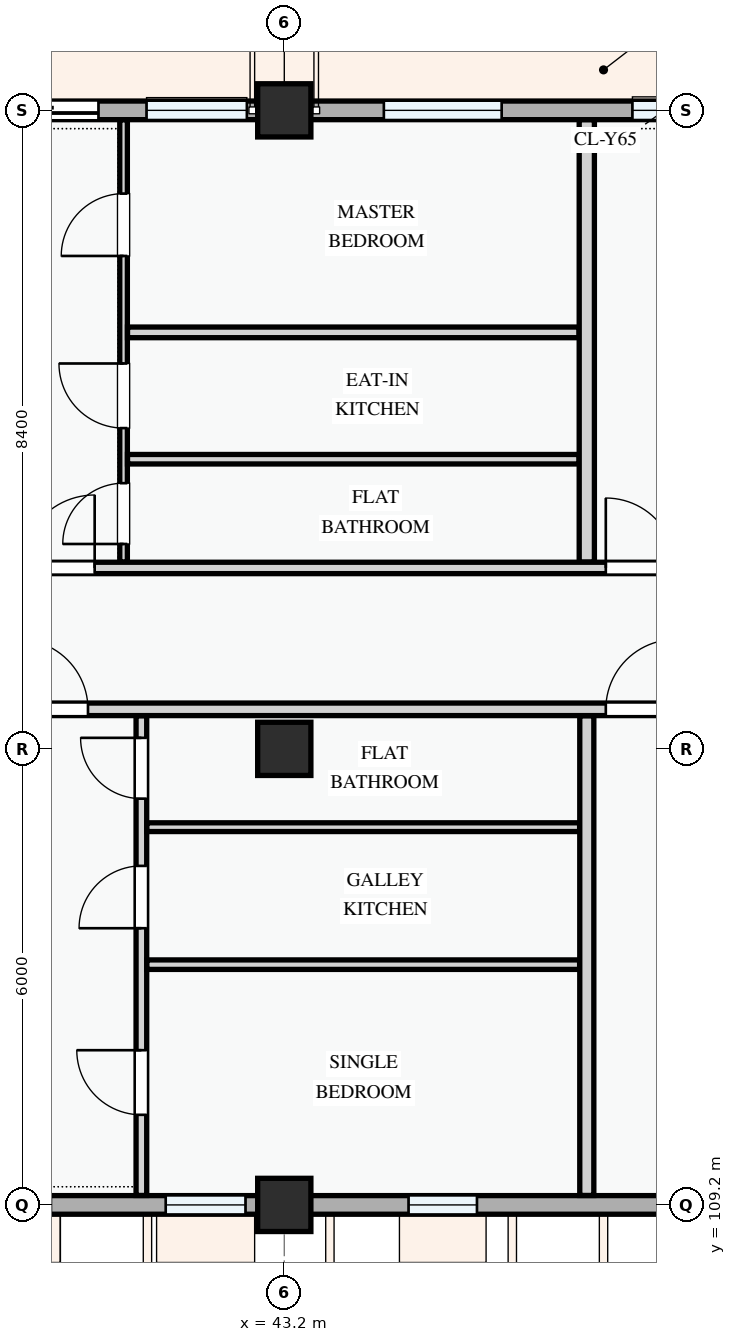
"""IFC4 building model, lengths in metres.
Left out: names, types, materials, properties, quantities, classifications, styles, units other than length and angle.
Written with IfcOpenShell. Run it as: python <this file> out.ifc"""

import sys

from ifc_helpers import new_model, si_unit, direction, frame, frame_2d, origin, origin_2d, place, context, subcontext, project, spatial, rectangle, extrude, element, fill, save


model = new_model("IFC4")
c1 = context("Model", 3, precision=1e-05, world=origin(), true_north=direction((0.0, 1.0)))
c2 = subcontext(c1, "Body", "Model", "MODEL_VIEW")
j1 = project(units=[si_unit("LENGTHUNIT", "METRE"), si_unit("PLANEANGLEUNIT", "RADIAN")], contexts=[c1])
p1 = place(None, origin())
s1 = spatial("IfcSite", under=j1, at=p1, CompositionType="ELEMENT")
p2 = place(p1, origin())
s2 = spatial("IfcBuilding", under=s1, at=p2, CompositionType="ELEMENT")
p3 = place(p2, frame((0.0, 0.0, 8.1)))
s3 = spatial("IfcBuildingStorey", under=s2, at=p3, CompositionType="ELEMENT", Elevation=8.1)
for number, where, z_axis, x_axis in (
    (1, (43.2, 109.2, 0.0), (0.0, 0.0, 1.0), (1.0, 0.0, 0.0)),
    (2, (43.2, 115.2, 0.0), (0.0, 0.0, 1.0), (1.0, 0.0, 0.0)),
    (3, (43.2, 123.6, 0.0), (0.0, 0.0, 1.0), (1.0, 0.0, 0.0)),
):
    element("IfcColumn", number, at=place(p3, frame(where, z_axis=z_axis, x_axis=x_axis)), inside=s3, PredefinedType="COLUMN", context=c2, shape_type="SweptSolid", body=[
        extrude(rectangle(XDim=0.7, YDim=0.7, at=origin_2d()), origin(), (0.0, 0.0, 1.0), 3.3),
    ])
p4 = place(p3, frame((37.2, 109.2, 0.0), z_axis=(0.0, 0.0, 1.0), x_axis=(1.0, 0.0, 0.0)))
e4 = element("IfcWall", 4, at=p4, inside=s3, PredefinedType="STANDARD", context=c2, shape_type="SweptSolid", body=[
    extrude(rectangle(XDim=6.0, YDim=0.245, at=frame_2d((3.0, 0.0))), origin(), (0.0, 0.0, 1.0), 2.475),
])
p5 = place(p4, frame((1.38, 0.0, 0.78)))
e5 = element("IfcOpeningElement", 5, at=p5, cuts=e4, PredefinedType="OPENING", context=c2, shape_type="SweptSolid", body=[
    extrude(rectangle(XDim=1.55, YDim=1.4, at=frame_2d((0.775, 0.7))), frame((0.0, 0.133, 0.0), z_axis=(0.0, -1.0, 0.0), x_axis=(1.0, 0.0, 0.0)), (0.0, 0.0, 1.0), 0.265),
])
p6 = place(p4, frame((4.44, 0.0, 0.78)))
e6 = element("IfcOpeningElement", 6, at=p6, cuts=e4, PredefinedType="OPENING", context=c2, shape_type="SweptSolid", body=[
    extrude(rectangle(XDim=1.05, YDim=1.2, at=frame_2d((0.525, 0.6))), frame((0.0, 0.133, 0.0), z_axis=(0.0, -1.0, 0.0), x_axis=(1.0, 0.0, 0.0)), (0.0, 0.0, 1.0), 0.265),
])
p7 = place(p3, frame((43.2, 109.2, 0.0), z_axis=(0.0, 0.0, 1.0), x_axis=(1.0, 0.0, 0.0)))
e7 = element("IfcWall", 7, at=p7, inside=s3, PredefinedType="STANDARD", context=c2, shape_type="SweptSolid", body=[
    extrude(rectangle(XDim=8.4, YDim=0.245, at=frame_2d((4.2, 0.0))), origin(), (0.0, 0.0, 1.0), 2.375),
])
p8 = place(p7, frame((1.635, 0.0, 0.78)))
e8 = element("IfcOpeningElement", 8, at=p8, cuts=e7, PredefinedType="OPENING", context=c2, shape_type="SweptSolid", body=[
    extrude(rectangle(XDim=0.9, YDim=1.2, at=frame_2d((0.45, 0.6))), frame((0.0, 0.133, 0.0), z_axis=(0.0, -1.0, 0.0), x_axis=(1.0, 0.0, 0.0)), (0.0, 0.0, 1.0), 0.265),
])
p9 = place(p7, frame((5.395, 0.0, 0.78)))
e9 = element("IfcOpeningElement", 9, at=p9, cuts=e7, PredefinedType="OPENING", context=c2, shape_type="SweptSolid", body=[
    extrude(rectangle(XDim=1.4, YDim=1.45, at=frame_2d((0.7, 0.725))), frame((0.0, 0.133, 0.0), z_axis=(0.0, -1.0, 0.0), x_axis=(1.0, 0.0, 0.0)), (0.0, 0.0, 1.0), 0.265),
])
p10 = place(p3, frame((51.6, 123.6, 0.0), z_axis=(0.0, 0.0, 1.0), x_axis=(-1.0, 0.0, 0.0)))
e10 = element("IfcWall", 10, at=p10, inside=s3, PredefinedType="STANDARD", context=c2, shape_type="SweptSolid", body=[
    extrude(rectangle(XDim=8.4, YDim=0.245, at=frame_2d((4.2, 0.0))), origin(), (0.0, 0.0, 1.0), 2.345),
])
p11 = place(p10, frame((0.62, 0.0, 0.0)))
e11 = element("IfcOpeningElement", 11, at=p11, cuts=e10, PredefinedType="OPENING", context=c2, shape_type="SweptSolid", body=[
    extrude(rectangle(XDim=1.3, YDim=2.15, at=frame_2d((0.65, 1.075))), frame((0.0, 0.133, 0.0), z_axis=(0.0, -1.0, 0.0), x_axis=(1.0, 0.0, 0.0)), (0.0, 0.0, 1.0), 0.265),
])
p12 = place(p10, frame((2.57, 0.0, 0.78)))
e12 = element("IfcOpeningElement", 12, at=p12, cuts=e10, PredefinedType="OPENING", context=c2, shape_type="SweptSolid", body=[
    extrude(rectangle(XDim=1.25, YDim=1.45, at=frame_2d((0.625, 0.725))), frame((0.0, 0.133, 0.0), z_axis=(0.0, -1.0, 0.0), x_axis=(1.0, 0.0, 0.0)), (0.0, 0.0, 1.0), 0.265),
])
p13 = place(p10, frame((5.54, 0.0, 0.78)))
e13 = element("IfcOpeningElement", 13, at=p13, cuts=e10, PredefinedType="OPENING", context=c2, shape_type="SweptSolid", body=[
    extrude(rectangle(XDim=1.55, YDim=1.4, at=frame_2d((0.775, 0.7))), frame((0.0, 0.133, 0.0), z_axis=(0.0, -1.0, 0.0), x_axis=(1.0, 0.0, 0.0)), (0.0, 0.0, 1.0), 0.265),
])
p14 = place(p3, frame((43.2, 123.6, 0.0), z_axis=(0.0, 0.0, 1.0), x_axis=(-1.0, 0.0, 0.0)))
e14 = element("IfcWall", 14, at=p14, inside=s3, PredefinedType="STANDARD", context=c2, shape_type="SweptSolid", body=[
    extrude(rectangle(XDim=6.0, YDim=0.245, at=frame_2d((3.0, 0.0))), origin(), (0.0, 0.0, 1.0), 2.445),
])
p15 = place(p14, frame((2.444, 0.0, 0.0)))
e15 = element("IfcOpeningElement", 15, at=p15, cuts=e14, PredefinedType="OPENING", context=c2, shape_type="SweptSolid", body=[
    extrude(rectangle(XDim=1.4, YDim=2.2, at=frame_2d((0.7, 1.1))), frame((0.0, 0.133, 0.0), z_axis=(0.0, -1.0, 0.0), x_axis=(1.0, 0.0, 0.0)), (0.0, 0.0, 1.0), 0.265),
])
p16 = place(p14, frame((0.492, 0.0, 0.78)))
e16 = element("IfcOpeningElement", 16, at=p16, cuts=e14, PredefinedType="OPENING", context=c2, shape_type="SweptSolid", body=[
    extrude(rectangle(XDim=1.32, YDim=1.35, at=frame_2d((0.66, 0.675))), frame((0.0, 0.133, 0.0), z_axis=(0.0, -1.0, 0.0), x_axis=(1.0, 0.0, 0.0)), (0.0, 0.0, 1.0), 0.265),
])
p17 = place(p14, frame((4.327, 0.0, 0.78)))
e17 = element("IfcOpeningElement", 17, at=p17, cuts=e14, PredefinedType="OPENING", context=c2, shape_type="SweptSolid", body=[
    extrude(rectangle(XDim=1.05, YDim=1.2, at=frame_2d((0.525, 0.6))), frame((0.0, 0.133, 0.0), z_axis=(0.0, -1.0, 0.0), x_axis=(1.0, 0.0, 0.0)), (0.0, 0.0, 1.0), 0.265),
])
p18 = place(p3, frame((41.32, 109.324, 0.0), z_axis=(0.0, 0.0, 1.0), x_axis=(0.0, 1.0, 0.0)))
e18 = element("IfcWall", 18, at=p18, inside=s3, PredefinedType="PARTITIONING", context=c2, shape_type="SweptSolid", body=[
    extrude(rectangle(XDim=6.311, YDim=0.14, at=frame_2d((3.156, 0.0))), origin(), (0.0, 0.0, 1.0), 3.0),
])
p19 = place(p18, frame((1.061, 0.0, 0.0)))
e19 = element("IfcOpeningElement", 19, at=p19, cuts=e18, PredefinedType="OPENING", context=c2, shape_type="SweptSolid", body=[
    extrude(rectangle(XDim=0.85, YDim=2.1, at=frame_2d((0.425, 1.05))), frame((0.0, 0.08, 0.0), z_axis=(0.0, -1.0, 0.0), x_axis=(1.0, 0.0, 0.0)), (0.0, 0.0, 1.0), 0.16),
])
p20 = place(p18, frame((3.516, 0.0, 0.0)))
e20 = element("IfcOpeningElement", 20, at=p20, cuts=e18, PredefinedType="OPENING", context=c2, shape_type="SweptSolid", body=[
    extrude(rectangle(XDim=0.82, YDim=2.08, at=frame_2d((0.41, 1.04))), frame((0.0, 0.08, 0.0), z_axis=(0.0, -1.0, 0.0), x_axis=(1.0, 0.0, 0.0)), (0.0, 0.0, 1.0), 0.16),
])
p21 = place(p18, frame((5.22, 0.0, 0.0)))
e21 = element("IfcOpeningElement", 21, at=p21, cuts=e18, PredefinedType="OPENING", context=c2, shape_type="SweptSolid", body=[
    extrude(rectangle(XDim=0.8, YDim=2.1, at=frame_2d((0.4, 1.05))), frame((0.0, 0.08, 0.0), z_axis=(0.0, -1.0, 0.0), x_axis=(1.0, 0.0, 0.0)), (0.0, 0.0, 1.0), 0.16),
])
p22 = place(p3, frame((41.392, 112.361, 0.0), z_axis=(0.0, 0.0, 1.0), x_axis=(1.0, 0.0, 0.0)))
e22 = element("IfcWall", 22, at=p22, inside=s3, PredefinedType="PARTITIONING", context=c2, shape_type="SweptSolid", body=[
    extrude(rectangle(XDim=5.693, YDim=0.125, at=frame_2d((2.847, 0.0))), origin(), (0.0, 0.0, 1.0), 3.0),
])
p23 = place(p3, frame((41.392, 114.17, 0.0), z_axis=(0.0, 0.0, 1.0), x_axis=(1.0, 0.0, 0.0)))
e23 = element("IfcWall", 23, at=p23, inside=s3, PredefinedType="PARTITIONING", context=c2, shape_type="SweptSolid", body=[
    extrude(rectangle(XDim=5.693, YDim=0.115, at=frame_2d((2.847, 0.0))), origin(), (0.0, 0.0, 1.0), 3.0),
])
p24 = place(p3, frame((41.086, 117.657, 0.0), z_axis=(0.0, 0.0, 1.0), x_axis=(0.0, 1.0, 0.0)))
e24 = element("IfcWall", 24, at=p24, inside=s3, PredefinedType="PARTITIONING", context=c2, shape_type="SweptSolid", body=[
    extrude(rectangle(XDim=5.819, YDim=0.1, at=frame_2d((2.909, 0.0))), origin(), (0.0, 0.0, 1.0), 3.0),
])
p25 = place(p24, frame((0.238, 0.0, 0.0)))
e25 = element("IfcOpeningElement", 25, at=p25, cuts=e24, PredefinedType="OPENING", context=c2, shape_type="SweptSolid", body=[
    extrude(rectangle(XDim=0.8, YDim=2.1, at=frame_2d((0.4, 1.05))), frame((0.0, 0.06, 0.0), z_axis=(0.0, -1.0, 0.0), x_axis=(1.0, 0.0, 0.0)), (0.0, 0.0, 1.0), 0.12),
])
p26 = place(p24, frame((1.763, 0.0, 0.0)))
e26 = element("IfcOpeningElement", 26, at=p26, cuts=e24, PredefinedType="OPENING", context=c2, shape_type="SweptSolid", body=[
    extrude(rectangle(XDim=0.85, YDim=2.1, at=frame_2d((0.425, 1.05))), frame((0.0, 0.06, 0.0), z_axis=(0.0, -1.0, 0.0), x_axis=(1.0, 0.0, 0.0)), (0.0, 0.0, 1.0), 0.12),
])
p27 = place(p24, frame((4.028, 0.0, 0.0)))
e27 = element("IfcOpeningElement", 27, at=p27, cuts=e24, PredefinedType="OPENING", context=c2, shape_type="SweptSolid", body=[
    extrude(rectangle(XDim=0.82, YDim=2.08, at=frame_2d((0.41, 1.04))), frame((0.0, 0.06, 0.0), z_axis=(0.0, -1.0, 0.0), x_axis=(1.0, 0.0, 0.0)), (0.0, 0.0, 1.0), 0.12),
])
p28 = place(p3, frame((41.138, 120.679, 0.0), z_axis=(0.0, 0.0, 1.0), x_axis=(1.0, 0.0, 0.0)))
e28 = element("IfcWall", 28, at=p28, inside=s3, PredefinedType="PARTITIONING", context=c2, shape_type="SweptSolid", body=[
    extrude(rectangle(XDim=5.94, YDim=0.14, at=frame_2d((2.97, 0.0))), origin(), (0.0, 0.0, 1.0), 3.0),
])
p29 = place(p3, frame((41.138, 119.01, 0.0), z_axis=(0.0, 0.0, 1.0), x_axis=(1.0, 0.0, 0.0)))
e29 = element("IfcWall", 29, at=p29, inside=s3, PredefinedType="PARTITIONING", context=c2, shape_type="SweptSolid", body=[
    extrude(rectangle(XDim=5.94, YDim=0.125, at=frame_2d((2.97, 0.0))), origin(), (0.0, 0.0, 1.0), 3.0),
])
p30 = place(p3, frame((47.18, 109.324, 0.0), z_axis=(0.0, 0.0, 1.0), x_axis=(0.0, 1.0, 0.0)))
e30 = element("IfcWall", 30, at=p30, inside=s3, PredefinedType="PARTITIONING", context=c2, shape_type="SweptSolid", body=[
    extrude(rectangle(XDim=6.311, YDim=0.185, at=frame_2d((3.156, 0.0))), origin(), (0.0, 0.0, 1.0), 2.585),
])
p31 = place(p3, frame((47.18, 117.657, 0.0), z_axis=(0.0, 0.0, 1.0), x_axis=(0.0, 1.0, 0.0)))
e31 = element("IfcWall", 31, at=p31, inside=s3, PredefinedType="PARTITIONING", context=c2, shape_type="SweptSolid", body=[
    extrude(rectangle(XDim=5.819, YDim=0.2, at=frame_2d((2.909, 0.0))), origin(), (0.0, 0.0, 1.0), 2.585),
])
p32 = place(p3, frame((25.15, 115.72, 0.0), z_axis=(0.0, 0.0, 1.0), x_axis=(1.0, 0.0, 0.0)))
e32 = element("IfcWall", 32, at=p32, inside=s3, PredefinedType="PARTITIONING", context=c2, shape_type="SweptSolid", body=[
    extrude(rectangle(XDim=32.326, YDim=0.165, at=frame_2d((16.163, 0.0))), origin(), (0.0, 0.0, 1.0), 3.0),
])
p33 = place(p32, frame((0.25, 0.0, 0.0)))
e33 = element("IfcOpeningElement", 33, at=p33, cuts=e32, PredefinedType="OPENING", context=c2, shape_type="SweptSolid", body=[
    extrude(rectangle(XDim=0.92, YDim=2.1, at=frame_2d((0.46, 1.05))), frame((0.0, 0.093, 0.0), z_axis=(0.0, -1.0, 0.0), x_axis=(1.0, 0.0, 0.0)), (0.0, 0.0, 1.0), 0.185),
])
p34 = place(p32, frame((14.548, 0.0, 0.0)))
e34 = element("IfcOpeningElement", 34, at=p34, cuts=e32, PredefinedType="OPENING", context=c2, shape_type="SweptSolid", body=[
    extrude(rectangle(XDim=0.92, YDim=2.1, at=frame_2d((0.46, 1.05))), frame((0.0, 0.093, 0.0), z_axis=(0.0, -1.0, 0.0), x_axis=(1.0, 0.0, 0.0)), (0.0, 0.0, 1.0), 0.185),
])
p35 = place(p32, frame((22.28, 0.0, 0.0)))
e35 = element("IfcOpeningElement", 35, at=p35, cuts=e32, PredefinedType="OPENING", context=c2, shape_type="SweptSolid", body=[
    extrude(rectangle(XDim=0.92, YDim=2.1, at=frame_2d((0.46, 1.05))), frame((0.0, 0.093, 0.0), z_axis=(0.0, -1.0, 0.0), x_axis=(1.0, 0.0, 0.0)), (0.0, 0.0, 1.0), 0.185),
])
p36 = place(p3, frame((22.66, 117.58, 0.0), z_axis=(0.0, 0.0, 1.0), x_axis=(1.0, 0.0, 0.0)))
e36 = element("IfcWall", 36, at=p36, inside=s3, PredefinedType="PARTITIONING", context=c2, shape_type="SweptSolid", body=[
    extrude(rectangle(XDim=34.816, YDim=0.15, at=frame_2d((17.408, 0.0))), origin(), (0.0, 0.0, 1.0), 3.0),
])
p37 = place(p36, frame((2.74, 0.0, 0.0)))
e37 = element("IfcOpeningElement", 37, at=p37, cuts=e36, PredefinedType="OPENING", context=c2, shape_type="SweptSolid", body=[
    extrude(rectangle(XDim=0.92, YDim=2.1, at=frame_2d((0.46, 1.05))), frame((0.0, 0.085, 0.0), z_axis=(0.0, -1.0, 0.0), x_axis=(1.0, 0.0, 0.0)), (0.0, 0.0, 1.0), 0.17),
])
p38 = place(p36, frame((17.085, 0.0, 0.0)))
e38 = element("IfcOpeningElement", 38, at=p38, cuts=e36, PredefinedType="OPENING", context=c2, shape_type="SweptSolid", body=[
    extrude(rectangle(XDim=0.96, YDim=2.12, at=frame_2d((0.48, 1.06))), frame((0.0, 0.085, 0.0), z_axis=(0.0, -1.0, 0.0), x_axis=(1.0, 0.0, 0.0)), (0.0, 0.0, 1.0), 0.17),
])
p39 = place(p36, frame((24.77, 0.0, 0.0)))
e39 = element("IfcOpeningElement", 39, at=p39, cuts=e36, PredefinedType="OPENING", context=c2, shape_type="SweptSolid", body=[
    extrude(rectangle(XDim=0.92, YDim=2.1, at=frame_2d((0.46, 1.05))), frame((0.0, 0.085, 0.0), z_axis=(0.0, -1.0, 0.0), x_axis=(1.0, 0.0, 0.0)), (0.0, 0.0, 1.0), 0.17),
])
p40 = place(p6, origin())
e40 = element("IfcWindow", 40, at=p40, inside=s3, PartitioningType="SINGLE_PANEL", PredefinedType="WINDOW", context=c2, shape_type="SweptSolid", body=[
    extrude(rectangle(XDim=1.05, YDim=1.2, at=frame_2d((0.525, 0.6))), frame((0.0, 0.03, 0.0), z_axis=(0.0, -1.0, 0.0), x_axis=(1.0, 0.0, 0.0)), (0.0, 0.0, 1.0), 0.06),
])
fill(e6, e40)
p41 = place(p8, origin())
e41 = element("IfcWindow", 41, at=p41, inside=s3, PartitioningType="SINGLE_PANEL", PredefinedType="WINDOW", context=c2, shape_type="SweptSolid", body=[
    extrude(rectangle(XDim=0.9, YDim=1.2, at=frame_2d((0.45, 0.6))), frame((0.0, 0.03, 0.0), z_axis=(0.0, -1.0, 0.0), x_axis=(1.0, 0.0, 0.0)), (0.0, 0.0, 1.0), 0.06),
])
fill(e8, e41)
p42 = place(p12, origin())
e42 = element("IfcWindow", 42, at=p42, inside=s3, PartitioningType="SINGLE_PANEL", PredefinedType="WINDOW", context=c2, shape_type="SweptSolid", body=[
    extrude(rectangle(XDim=1.25, YDim=1.45, at=frame_2d((0.625, 0.725))), frame((0.0, 0.03, 0.0), z_axis=(0.0, -1.0, 0.0), x_axis=(1.0, 0.0, 0.0)), (0.0, 0.0, 1.0), 0.06),
])
fill(e12, e42)
p43 = place(p13, origin())
e43 = element("IfcWindow", 43, at=p43, inside=s3, PartitioningType="SINGLE_PANEL", PredefinedType="WINDOW", context=c2, shape_type="SweptSolid", body=[
    extrude(rectangle(XDim=1.55, YDim=1.4, at=frame_2d((0.775, 0.7))), frame((0.0, 0.03, 0.0), z_axis=(0.0, -1.0, 0.0), x_axis=(1.0, 0.0, 0.0)), (0.0, 0.0, 1.0), 0.06),
])
fill(e13, e43)
p44 = place(p15, frame((1.4, 0.0, 0.0), z_axis=(0.0, 0.0, 1.0), x_axis=(-1.0, 0.0, 0.0)))
e44 = element("IfcDoor", 44, at=p44, inside=s3, OperationType="SLIDING_TO_LEFT", PredefinedType="DOOR", context=c2, shape_type="SweptSolid", body=[
    extrude(rectangle(XDim=1.4, YDim=2.2, at=frame_2d((0.7, 1.1))), frame((0.0, 0.025, 0.0), z_axis=(0.0, -1.0, 0.0), x_axis=(1.0, 0.0, 0.0)), (0.0, 0.0, 1.0), 0.05),
])
fill(e15, e44)
p45 = place(p16, origin())
e45 = element("IfcWindow", 45, at=p45, inside=s3, PartitioningType="SINGLE_PANEL", PredefinedType="WINDOW", context=c2, shape_type="SweptSolid", body=[
    extrude(rectangle(XDim=1.32, YDim=1.35, at=frame_2d((0.66, 0.675))), frame((0.0, 0.03, 0.0), z_axis=(0.0, -1.0, 0.0), x_axis=(1.0, 0.0, 0.0)), (0.0, 0.0, 1.0), 0.06),
])
fill(e16, e45)
p46 = place(p19, origin())
e46 = element("IfcDoor", 46, at=p46, inside=s3, OperationType="SINGLE_SWING_RIGHT", PredefinedType="DOOR", context=c2, shape_type="SweptSolid", body=[
    extrude(rectangle(XDim=0.85, YDim=2.1, at=frame_2d((0.425, 1.05))), frame((0.0, 0.025, 0.0), z_axis=(0.0, -1.0, 0.0), x_axis=(1.0, 0.0, 0.0)), (0.0, 0.0, 1.0), 0.05),
])
fill(e19, e46)
p47 = place(p20, origin())
e47 = element("IfcDoor", 47, at=p47, inside=s3, OperationType="SINGLE_SWING_LEFT", PredefinedType="DOOR", context=c2, shape_type="SweptSolid", body=[
    extrude(rectangle(XDim=0.82, YDim=2.08, at=frame_2d((0.41, 1.04))), frame((0.0, 0.025, 0.0), z_axis=(0.0, -1.0, 0.0), x_axis=(1.0, 0.0, 0.0)), (0.0, 0.0, 1.0), 0.05),
])
fill(e20, e47)
p48 = place(p21, origin())
e48 = element("IfcDoor", 48, at=p48, inside=s3, OperationType="SINGLE_SWING_RIGHT", PredefinedType="DOOR", context=c2, shape_type="SweptSolid", body=[
    extrude(rectangle(XDim=0.8, YDim=2.1, at=frame_2d((0.4, 1.05))), frame((0.0, 0.025, 0.0), z_axis=(0.0, -1.0, 0.0), x_axis=(1.0, 0.0, 0.0)), (0.0, 0.0, 1.0), 0.05),
])
fill(e21, e48)
p49 = place(p25, origin())
e49 = element("IfcDoor", 49, at=p49, inside=s3, OperationType="SINGLE_SWING_LEFT", PredefinedType="DOOR", context=c2, shape_type="SweptSolid", body=[
    extrude(rectangle(XDim=0.8, YDim=2.1, at=frame_2d((0.4, 1.05))), frame((0.0, 0.025, 0.0), z_axis=(0.0, -1.0, 0.0), x_axis=(1.0, 0.0, 0.0)), (0.0, 0.0, 1.0), 0.05),
])
fill(e25, e49)
p50 = place(p26, origin())
e50 = element("IfcDoor", 50, at=p50, inside=s3, OperationType="SINGLE_SWING_RIGHT", PredefinedType="DOOR", context=c2, shape_type="SweptSolid", body=[
    extrude(rectangle(XDim=0.85, YDim=2.1, at=frame_2d((0.425, 1.05))), frame((0.0, 0.025, 0.0), z_axis=(0.0, -1.0, 0.0), x_axis=(1.0, 0.0, 0.0)), (0.0, 0.0, 1.0), 0.05),
])
fill(e26, e50)
p51 = place(p27, origin())
e51 = element("IfcDoor", 51, at=p51, inside=s3, OperationType="SINGLE_SWING_LEFT", PredefinedType="DOOR", context=c2, shape_type="SweptSolid", body=[
    extrude(rectangle(XDim=0.82, YDim=2.08, at=frame_2d((0.41, 1.04))), frame((0.0, 0.025, 0.0), z_axis=(0.0, -1.0, 0.0), x_axis=(1.0, 0.0, 0.0)), (0.0, 0.0, 1.0), 0.05),
])
fill(e27, e51)
p52 = place(p34, origin())
e52 = element("IfcDoor", 52, at=p52, inside=s3, OperationType="SINGLE_SWING_LEFT", PredefinedType="DOOR", context=c2, shape_type="SweptSolid", body=[
    extrude(rectangle(XDim=0.92, YDim=2.1, at=frame_2d((0.46, 1.05))), frame((0.0, 0.025, 0.0), z_axis=(0.0, -1.0, 0.0), x_axis=(1.0, 0.0, 0.0)), (0.0, 0.0, 1.0), 0.05),
])
fill(e34, e52)
p53 = place(p35, origin())
e53 = element("IfcDoor", 53, at=p53, inside=s3, OperationType="SINGLE_SWING_RIGHT", PredefinedType="DOOR", context=c2, shape_type="SweptSolid", body=[
    extrude(rectangle(XDim=0.92, YDim=2.1, at=frame_2d((0.46, 1.05))), frame((0.0, 0.025, 0.0), z_axis=(0.0, -1.0, 0.0), x_axis=(1.0, 0.0, 0.0)), (0.0, 0.0, 1.0), 0.05),
])
fill(e35, e53)
p54 = place(p38, origin())
e54 = element("IfcDoor", 54, at=p54, inside=s3, OperationType="SINGLE_SWING_RIGHT", PredefinedType="DOOR", context=c2, shape_type="SweptSolid", body=[
    extrude(rectangle(XDim=0.96, YDim=2.12, at=frame_2d((0.48, 1.06))), frame((0.0, 0.025, 0.0), z_axis=(0.0, -1.0, 0.0), x_axis=(1.0, 0.0, 0.0)), (0.0, 0.0, 1.0), 0.05),
])
fill(e38, e54)
p55 = place(p39, origin())
e55 = element("IfcDoor", 55, at=p55, inside=s3, OperationType="SINGLE_SWING_LEFT", PredefinedType="DOOR", context=c2, shape_type="SweptSolid", body=[
    extrude(rectangle(XDim=0.92, YDim=2.1, at=frame_2d((0.46, 1.05))), frame((0.0, 0.025, 0.0), z_axis=(0.0, -1.0, 0.0), x_axis=(1.0, 0.0, 0.0)), (0.0, 0.0, 1.0), 0.05),
])
fill(e39, e55)
save(model, sys.argv[1])
